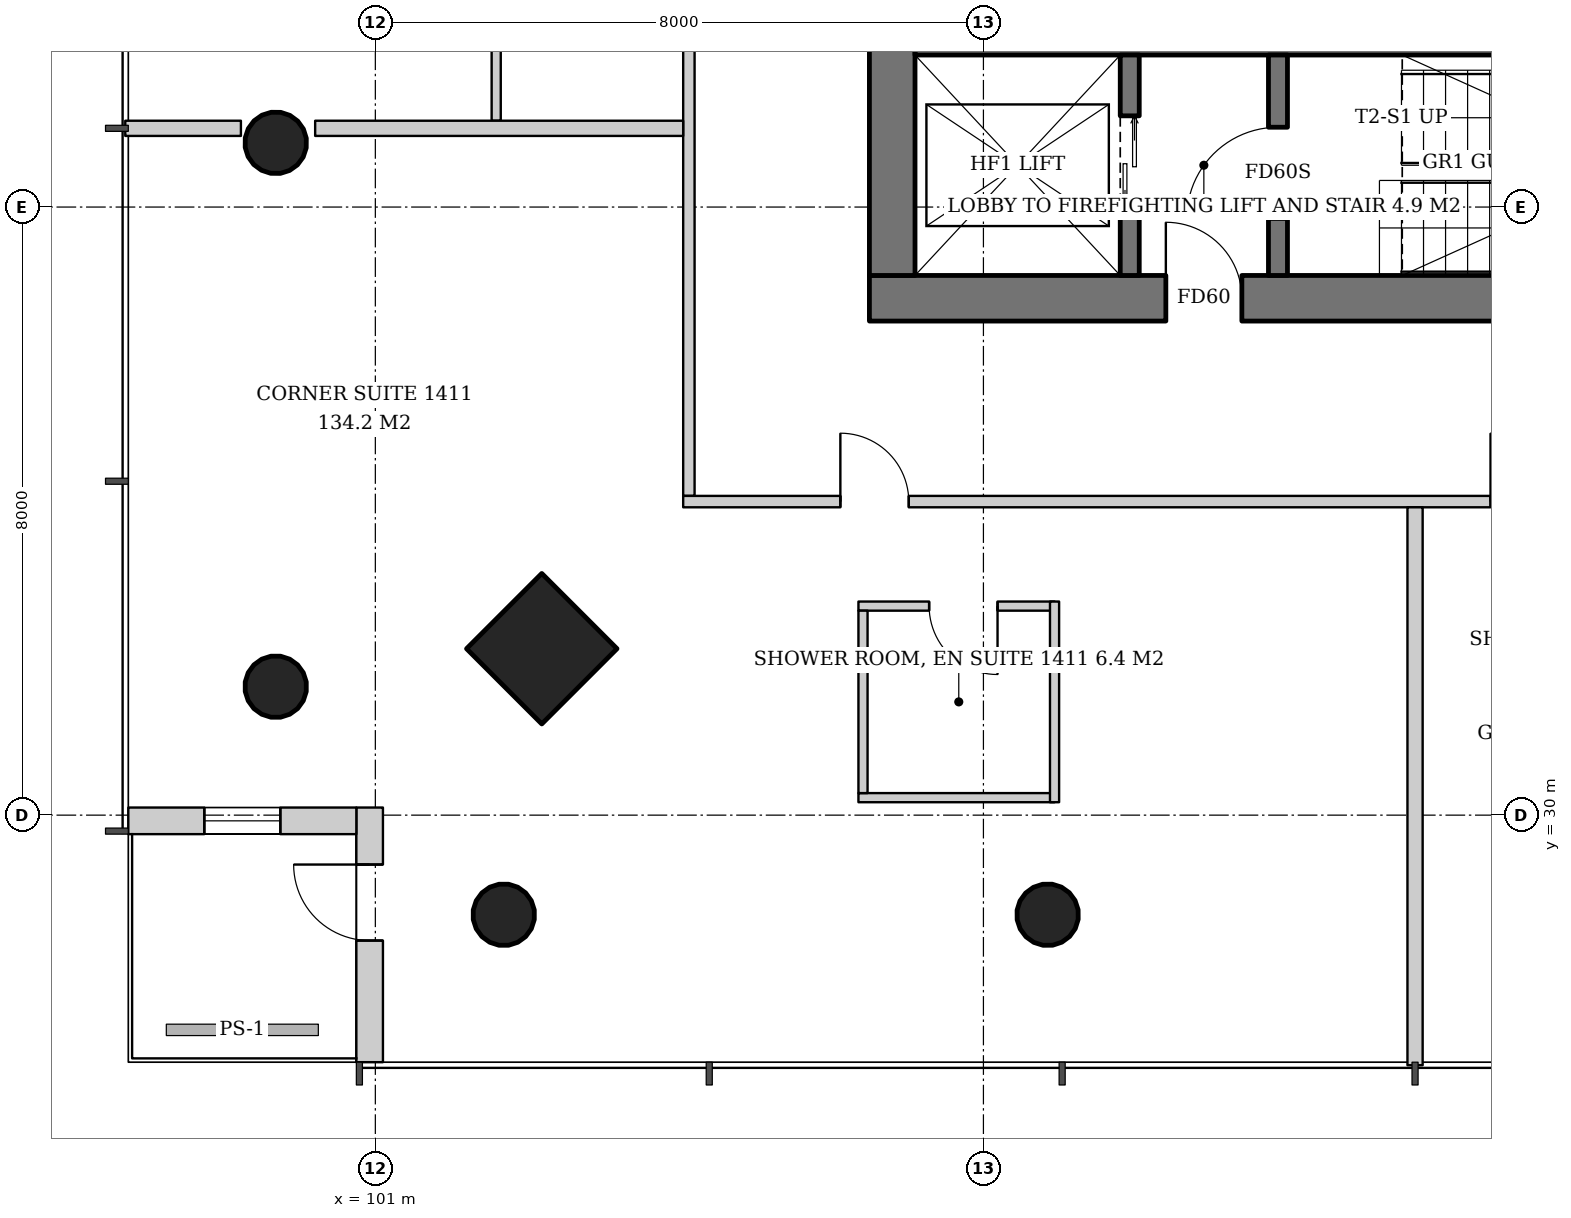
"""IFC4 building model, lengths in metres.
Left out: names, types, materials, properties, quantities, classifications, styles, units other than length and angle.
Written with IfcOpenShell. Run it as: python <this file> out.ifc"""

import sys

from ifc_helpers import new_model, si_unit, direction, frame, frame_2d, origin, origin_2d, place, context, subcontext, project, spatial, rectangle, hollow_circle, extrude, element, fill, save


model = new_model("IFC4")
c1 = context("Model", 3, precision=1e-05, world=origin(), true_north=direction((0.0, 1.0)))
c2 = subcontext(c1, "Body", "Model", "MODEL_VIEW")
j1 = project(units=[si_unit("LENGTHUNIT", "METRE"), si_unit("PLANEANGLEUNIT", "RADIAN")], contexts=[c1])
p1 = place(None, origin())
s1 = spatial("IfcSite", under=j1, at=p1, CompositionType="ELEMENT")
p2 = place(p1, origin())
s2 = spatial("IfcBuilding", under=s1, at=p2, CompositionType="ELEMENT")
p3 = place(p2, frame((0.0, 0.0, 59.0)))
s3 = spatial("IfcBuildingStorey", under=s2, at=p3, CompositionType="ELEMENT", Elevation=59.0)
p4 = place(p3, frame((103.138, 32.138, 0.0), z_axis=(0.043029647111, 0.043029647111, 0.998146732169), x_axis=(-0.707106781187, 0.707106781187, 0.0)))
e1 = element("IfcColumn", 1, at=p4, inside=s3, PredefinedType="COLUMN", context=c2, shape_type="SweptSolid", body=[
    extrude(rectangle(XDim=1.4, YDim=1.4, at=origin_2d()), origin(), (0.0, 0.0, 1.0), 3.807),
])
p5 = place(p3, frame((99.638, 31.638, 0.0), z_axis=(0.043029647111, 0.043029647111, 0.998146732169), x_axis=(-0.707106781187, 0.707106781187, 0.0)))
e2 = element("IfcColumn", 2, at=p5, inside=s3, PredefinedType="COLUMN", context=c2, shape_type="SweptSolid", body=[
    extrude(hollow_circle(Radius=0.406, WallThickness=0.03, at=origin_2d()), origin(), (0.0, 0.0, 1.0), 3.807),
])
p6 = place(p3, frame((99.638, 38.819, 0.0), z_axis=(0.043059525333, 0.021561848751, 0.998839808957), x_axis=(-0.44774654769, 0.894160516368, 0.0)))
e3 = element("IfcColumn", 3, at=p6, inside=s3, PredefinedType="COLUMN", context=c2, shape_type="SweptSolid", body=[
    extrude(hollow_circle(Radius=0.406, WallThickness=0.03, at=origin_2d()), origin(), (0.0, 0.0, 1.0), 3.804),
])
p7 = place(p3, frame((102.638, 28.638, 0.0), z_axis=(0.043029647111, 0.043029647111, 0.998146732169), x_axis=(-0.707106781187, 0.707106781187, 0.0)))
e4 = element("IfcColumn", 4, at=p7, inside=s3, PredefinedType="COLUMN", context=c2, shape_type="SweptSolid", body=[
    extrude(hollow_circle(Radius=0.406, WallThickness=0.03, at=origin_2d()), origin(), (0.0, 0.0, 1.0), 3.807),
])
p8 = place(p3, frame((109.819, 28.638, 0.0), z_axis=(0.021561848751, 0.043059525333, 0.998839808957), x_axis=(-0.894160516368, 0.44774654769, 0.0)))
e5 = element("IfcColumn", 5, at=p8, inside=s3, PredefinedType="COLUMN", context=c2, shape_type="SweptSolid", body=[
    extrude(hollow_circle(Radius=0.406, WallThickness=0.03, at=origin_2d()), origin(), (0.0, 0.0, 1.0), 3.804),
])
p9 = place(p3, frame((107.5, 36.8, 0.0), z_axis=(0.0, 0.0, 1.0), x_axis=(1.0, 0.0, 0.0)))
e6 = element("IfcWall", 6, at=p9, inside=s3, PredefinedType="SHEAR", context=c2, shape_type="SweptSolid", body=[
    extrude(rectangle(XDim=19.0, YDim=0.6, at=frame_2d((9.5, 0.0))), origin(), (0.0, 0.0, 1.0), 3.8),
])
p10 = place(p9, frame((3.9, 0.0, 0.0)))
e7 = element("IfcOpeningElement", 7, at=p10, cuts=e6, PredefinedType="OPENING", context=c2, shape_type="SweptSolid", body=[
    extrude(rectangle(XDim=1.0, YDim=2.1, at=frame_2d((0.5, 1.05))), frame((0.0, 0.31, 0.0), z_axis=(0.0, -1.0, 0.0), x_axis=(1.0, 0.0, 0.0)), (0.0, 0.0, 1.0), 0.62),
])
p11 = place(p9, frame((14.61, 0.0, 0.0)))
e8 = element("IfcOpeningElement", 8, at=p11, cuts=e6, PredefinedType="OPENING", context=c2, shape_type="SweptSolid", body=[
    extrude(rectangle(XDim=1.0, YDim=2.1, at=frame_2d((0.5, 1.05))), frame((0.0, 0.31, 0.0), z_axis=(0.0, -1.0, 0.0), x_axis=(1.0, 0.0, 0.0)), (0.0, 0.0, 1.0), 0.62),
])
p12 = place(p9, frame((16.639, 0.0, 0.0)))
e9 = element("IfcOpeningElement", 9, at=p12, cuts=e6, PredefinedType="OPENING", context=c2, shape_type="SweptSolid", body=[
    extrude(rectangle(XDim=1.0, YDim=2.1, at=frame_2d((0.5, 1.05))), frame((0.0, 0.31, 0.0), z_axis=(0.0, -1.0, 0.0), x_axis=(1.0, 0.0, 0.0)), (0.0, 0.0, 1.0), 0.62),
])
p13 = place(p3, frame((107.8, 37.1, 0.0), z_axis=(0.0, 0.0, 1.0), x_axis=(0.0, 1.0, 0.0)))
e10 = element("IfcWall", 10, at=p13, inside=s3, PredefinedType="SHEAR", context=c2, shape_type="SweptSolid", body=[
    extrude(rectangle(XDim=17.8, YDim=0.6, at=frame_2d((8.9, 0.0))), origin(), (0.0, 0.0, 1.0), 3.8),
])
p14 = place(p13, frame((8.0, 0.0, 0.0)))
e11 = element("IfcOpeningElement", 11, at=p14, cuts=e10, PredefinedType="OPENING", context=c2, shape_type="SweptSolid", body=[
    extrude(rectangle(XDim=1.8, YDim=2.4, at=frame_2d((0.9, 1.2))), frame((0.0, 0.31, 0.0), z_axis=(0.0, -1.0, 0.0), x_axis=(1.0, 0.0, 0.0)), (0.0, 0.0, 1.0), 0.62),
])
p15 = place(p3, frame((108.1, 40.2, 0.0), z_axis=(0.0, 0.0, 1.0), x_axis=(1.0, 0.0, 0.0)))
e12 = element("IfcWall", 12, at=p15, inside=s3, PredefinedType="SHEAR", context=c2, shape_type="SweptSolid", body=[
    extrude(rectangle(XDim=17.8, YDim=0.4, at=frame_2d((8.9, 0.0))), origin(), (0.0, 0.0, 1.0), 3.8),
])
p16 = place(p3, frame((100.925, 26.75, 0.0), z_axis=(0.0, 0.0, 1.0), x_axis=(0.0, 1.0, 0.0)))
e13 = element("IfcWall", 13, at=p16, inside=s3, PredefinedType="SOLIDWALL", context=c2, shape_type="SweptSolid", body=[
    extrude(rectangle(XDim=3.35, YDim=0.35, at=frame_2d((1.675, 0.0))), origin(), (0.0, 0.0, 1.0), 3.6),
])
p17 = place(p16, frame((1.6, 0.0, 0.0)))
e14 = element("IfcOpeningElement", 14, at=p17, cuts=e13, PredefinedType="OPENING", context=c2, shape_type="SweptSolid", body=[
    extrude(rectangle(XDim=1.0, YDim=2.4, at=frame_2d((0.5, 1.2))), frame((0.0, 0.185, 0.0), z_axis=(0.0, -1.0, 0.0), x_axis=(1.0, 0.0, 0.0)), (0.0, 0.0, 1.0), 0.37),
])
p18 = place(p3, frame((100.75, 29.925, 0.0), z_axis=(0.0, 0.0, 1.0), x_axis=(-1.0, 0.0, 0.0)))
e15 = element("IfcWall", 15, at=p18, inside=s3, PredefinedType="SOLIDWALL", context=c2, shape_type="SweptSolid", body=[
    extrude(rectangle(XDim=3.0, YDim=0.35, at=frame_2d((1.5, 0.0))), origin(), (0.0, 0.0, 1.0), 3.6),
])
p19 = place(p18, frame((1.0, 0.0, 0.9)))
e16 = element("IfcOpeningElement", 16, at=p19, cuts=e15, PredefinedType="OPENING", context=c2, shape_type="SweptSolid", body=[
    extrude(rectangle(XDim=1.0, YDim=2.4, at=frame_2d((0.5, 1.2))), frame((0.0, 0.185, 0.0), z_axis=(0.0, -1.0, 0.0), x_axis=(1.0, 0.0, 0.0)), (0.0, 0.0, 1.0), 0.37),
])
p20 = place(p3, frame((110.925, 37.1, 0.0), z_axis=(0.0, 0.0, 1.0), x_axis=(0.0, 1.0, 0.0)))
e17 = element("IfcWall", 17, at=p20, inside=s3, PredefinedType="SHEAR", context=c2, shape_type="SweptSolid", body=[
    extrude(rectangle(XDim=2.9, YDim=0.25, at=frame_2d((1.45, 0.0))), origin(), (0.0, 0.0, 1.0), 3.8),
])
p21 = place(p20, frame((0.8, 0.0, 0.0)))
e18 = element("IfcOpeningElement", 18, at=p21, cuts=e17, PredefinedType="OPENING", context=c2, shape_type="SweptSolid", body=[
    extrude(rectangle(XDim=1.3, YDim=2.2, at=frame_2d((0.65, 1.1))), frame((0.0, 0.135, 0.0), z_axis=(0.0, -1.0, 0.0), x_axis=(1.0, 0.0, 0.0)), (0.0, 0.0, 1.0), 0.27),
])
p22 = place(p3, frame((112.875, 37.1, 0.0), z_axis=(0.0, 0.0, 1.0), x_axis=(0.0, 1.0, 0.0)))
e19 = element("IfcWall", 19, at=p22, inside=s3, PredefinedType="SHEAR", context=c2, shape_type="SweptSolid", body=[
    extrude(rectangle(XDim=2.9, YDim=0.25, at=frame_2d((1.45, 0.0))), origin(), (0.0, 0.0, 1.0), 3.8),
])
p23 = place(p22, frame((0.75, 0.0, 0.0)))
e20 = element("IfcOpeningElement", 20, at=p23, cuts=e19, PredefinedType="OPENING", context=c2, shape_type="SweptSolid", body=[
    extrude(rectangle(XDim=1.2, YDim=2.1, at=frame_2d((0.6, 1.05))), frame((0.0, 0.135, 0.0), z_axis=(0.0, -1.0, 0.0), x_axis=(1.0, 0.0, 0.0)), (0.0, 0.0, 1.0), 0.27),
])
p24 = place(p3, frame((102.59, 41.556, 0.0), z_axis=(0.0, 0.0, 1.0), x_axis=(0.0, -1.0, 0.0)))
e21 = element("IfcWall", 21, at=p24, inside=s3, PredefinedType="PARTITIONING", context=c2, shape_type="SweptSolid", body=[
    extrude(rectangle(XDim=2.42, YDim=0.12, at=frame_2d((1.21, 0.0))), origin(), (0.0, 0.0, 1.0), 3.6),
])
p25 = place(p3, frame((105.125, 57.95, 0.0), z_axis=(0.0, 0.0, 1.0), x_axis=(0.0, -1.0, 0.0)))
e22 = element("IfcWall", 22, at=p25, inside=s3, PredefinedType="PARTITIONING", context=c2, shape_type="SweptSolid", body=[
    extrude(rectangle(XDim=23.75, YDim=0.15, at=frame_2d((11.875, 0.0))), origin(), (0.0, 0.0, 1.0), 2.8),
])
p26 = place(p25, frame((2.068, 0.0, 0.0)))
e23 = element("IfcOpeningElement", 23, at=p26, cuts=e22, PredefinedType="OPENING", context=c2, shape_type="SweptSolid", body=[
    extrude(rectangle(XDim=0.9, YDim=2.1, at=frame_2d((0.45, 1.05))), frame((0.0, 0.085, 0.0), z_axis=(0.0, -1.0, 0.0), x_axis=(1.0, 0.0, 0.0)), (0.0, 0.0, 1.0), 0.17),
])
p27 = place(p25, frame((7.686, 0.0, 0.0)))
e24 = element("IfcOpeningElement", 24, at=p27, cuts=e22, PredefinedType="OPENING", context=c2, shape_type="SweptSolid", body=[
    extrude(rectangle(XDim=1.0, YDim=2.1, at=frame_2d((0.5, 1.05))), frame((0.0, 0.085, 0.0), z_axis=(0.0, -1.0, 0.0), x_axis=(1.0, 0.0, 0.0)), (0.0, 0.0, 1.0), 0.17),
])
p28 = place(p25, frame((12.379, 0.0, 0.0)))
e25 = element("IfcOpeningElement", 25, at=p28, cuts=e22, PredefinedType="OPENING", context=c2, shape_type="SweptSolid", body=[
    extrude(rectangle(XDim=0.9, YDim=2.1, at=frame_2d((0.45, 1.05))), frame((0.0, 0.085, 0.0), z_axis=(0.0, -1.0, 0.0), x_axis=(1.0, 0.0, 0.0)), (0.0, 0.0, 1.0), 0.17),
])
p29 = place(p25, frame((15.264, 0.0, 0.0)))
e26 = element("IfcOpeningElement", 26, at=p29, cuts=e22, PredefinedType="OPENING", context=c2, shape_type="SweptSolid", body=[
    extrude(rectangle(XDim=0.9, YDim=2.1, at=frame_2d((0.45, 1.05))), frame((0.0, 0.085, 0.0), z_axis=(0.0, -1.0, 0.0), x_axis=(1.0, 0.0, 0.0)), (0.0, 0.0, 1.0), 0.17),
])
p30 = place(p3, frame((105.05, 39.036, 0.0), z_axis=(0.0, 0.0, 1.0), x_axis=(-1.0, 0.0, 0.0)))
e27 = element("IfcWall", 27, at=p30, inside=s3, PredefinedType="PARTITIONING", context=c2, shape_type="SweptSolid", body=[
    extrude(rectangle(XDim=4.842, YDim=0.2, at=frame_2d((2.421, 0.0))), origin(), (0.0, 0.0, 1.0), 3.6),
])
p31 = place(p3, frame((99.231, 39.036, 0.0), z_axis=(0.0, 0.0, 1.0), x_axis=(-1.0, 0.0, 0.0)))
e28 = element("IfcWall", 28, at=p31, inside=s3, PredefinedType="PARTITIONING", context=c2, shape_type="SweptSolid", body=[
    extrude(rectangle(XDim=1.521, YDim=0.2, at=frame_2d((0.761, 0.0))), origin(), (0.0, 0.0, 1.0), 3.6),
])
p32 = place(p3, frame((109.936, 32.75, 0.0), z_axis=(0.0, 0.0, 1.0), x_axis=(-1.0, 0.0, 0.0)))
e29 = element("IfcWall", 29, at=p32, inside=s3, PredefinedType="PARTITIONING", context=c2, shape_type="SweptSolid", body=[
    extrude(rectangle(XDim=2.58, YDim=0.12, at=frame_2d((1.29, 0.0))), origin(), (0.0, 0.0, 1.0), 2.8),
])
p33 = place(p32, frame((0.75, 0.0, 0.0)))
e30 = element("IfcOpeningElement", 30, at=p33, cuts=e29, PredefinedType="OPENING", context=c2, shape_type="SweptSolid", body=[
    extrude(rectangle(XDim=0.9, YDim=2.1, at=frame_2d((0.45, 1.05))), frame((0.0, 0.07, 0.0), z_axis=(0.0, -1.0, 0.0), x_axis=(1.0, 0.0, 0.0)), (0.0, 0.0, 1.0), 0.14),
])
p34 = place(p3, frame((109.936, 30.23, 0.0), z_axis=(0.0, 0.0, 1.0), x_axis=(-1.0, 0.0, 0.0)))
e31 = element("IfcWall", 31, at=p34, inside=s3, PredefinedType="PARTITIONING", context=c2, shape_type="SweptSolid", body=[
    extrude(rectangle(XDim=2.58, YDim=0.12, at=frame_2d((1.29, 0.0))), origin(), (0.0, 0.0, 1.0), 2.8),
])
p35 = place(p3, frame((107.416, 32.69, 0.0), z_axis=(0.0, 0.0, 1.0), x_axis=(0.0, -1.0, 0.0)))
e32 = element("IfcWall", 32, at=p35, inside=s3, PredefinedType="PARTITIONING", context=c2, shape_type="SweptSolid", body=[
    extrude(rectangle(XDim=2.4, YDim=0.12, at=frame_2d((1.2, 0.0))), origin(), (0.0, 0.0, 1.0), 3.6),
])
p36 = place(p3, frame((109.936, 32.81, 0.0), z_axis=(0.0, 0.0, 1.0), x_axis=(0.0, -1.0, 0.0)))
e33 = element("IfcWall", 33, at=p36, inside=s3, PredefinedType="PARTITIONING", context=c2, shape_type="SweptSolid", body=[
    extrude(rectangle(XDim=2.64, YDim=0.12, at=frame_2d((1.32, 0.0))), origin(), (0.0, 0.0, 1.0), 3.6),
])
p37 = place(p3, frame((105.05, 34.125, 0.0), z_axis=(0.0, 0.0, 1.0), x_axis=(1.0, 0.0, 0.0)))
e34 = element("IfcWall", 34, at=p37, inside=s3, PredefinedType="PARTITIONING", context=c2, shape_type="SweptSolid", body=[
    extrude(rectangle(XDim=23.75, YDim=0.15, at=frame_2d((11.875, 0.0))), origin(), (0.0, 0.0, 1.0), 2.8),
])
p38 = place(p37, frame((2.068, 0.0, 0.0)))
e35 = element("IfcOpeningElement", 35, at=p38, cuts=e34, PredefinedType="OPENING", context=c2, shape_type="SweptSolid", body=[
    extrude(rectangle(XDim=0.9, YDim=2.1, at=frame_2d((0.45, 1.05))), frame((0.0, 0.085, 0.0), z_axis=(0.0, -1.0, 0.0), x_axis=(1.0, 0.0, 0.0)), (0.0, 0.0, 1.0), 0.17),
])
p39 = place(p37, frame((10.621, 0.0, 0.0)))
e36 = element("IfcOpeningElement", 36, at=p39, cuts=e34, PredefinedType="OPENING", context=c2, shape_type="SweptSolid", body=[
    extrude(rectangle(XDim=0.9, YDim=2.1, at=frame_2d((0.45, 1.05))), frame((0.0, 0.085, 0.0), z_axis=(0.0, -1.0, 0.0), x_axis=(1.0, 0.0, 0.0)), (0.0, 0.0, 1.0), 0.17),
])
p40 = place(p37, frame((17.021, 0.0, 0.0)))
e37 = element("IfcOpeningElement", 37, at=p40, cuts=e34, PredefinedType="OPENING", context=c2, shape_type="SweptSolid", body=[
    extrude(rectangle(XDim=0.9, YDim=2.1, at=frame_2d((0.45, 1.05))), frame((0.0, 0.085, 0.0), z_axis=(0.0, -1.0, 0.0), x_axis=(1.0, 0.0, 0.0)), (0.0, 0.0, 1.0), 0.17),
])
p41 = place(p3, frame((114.678, 34.05, 0.0), z_axis=(0.0, 0.0, 1.0), x_axis=(0.0, -1.0, 0.0)))
e38 = element("IfcWall", 38, at=p41, inside=s3, PredefinedType="PARTITIONING", context=c2, shape_type="SweptSolid", body=[
    extrude(rectangle(XDim=7.34, YDim=0.2, at=frame_2d((3.67, 0.0))), origin(), (0.0, 0.0, 1.0), 3.05),
])
p42 = place(p17, origin())
e39 = element("IfcDoor", 39, at=p42, inside=s3, OperationType="SINGLE_SWING_RIGHT", PredefinedType="DOOR", context=c2, shape_type="SweptSolid", body=[
    extrude(rectangle(XDim=1.0, YDim=2.4, at=frame_2d((0.5, 1.2))), frame((0.0, 0.025, 0.0), z_axis=(0.0, -1.0, 0.0), x_axis=(1.0, 0.0, 0.0)), (0.0, 0.0, 1.0), 0.05),
])
fill(e14, e39)
p43 = place(p19, origin())
e40 = element("IfcWindow", 40, at=p43, inside=s3, PartitioningType="SINGLE_PANEL", PredefinedType="WINDOW", context=c2, shape_type="SweptSolid", body=[
    extrude(rectangle(XDim=1.0, YDim=2.4, at=frame_2d((0.5, 1.2))), frame((0.0, 0.03, 0.0), z_axis=(0.0, -1.0, 0.0), x_axis=(1.0, 0.0, 0.0)), (0.0, 0.0, 1.0), 0.06),
])
fill(e16, e40)
p44 = place(p21, origin())
e41 = element("IfcDoor", 41, at=p44, inside=s3, OperationType="DOUBLE_DOOR_SLIDING", PredefinedType="DOOR", context=c2, shape_type="SweptSolid", body=[
    extrude(rectangle(XDim=1.3, YDim=2.2, at=frame_2d((0.65, 1.1))), frame((0.0, 0.025, 0.0), z_axis=(0.0, -1.0, 0.0), x_axis=(1.0, 0.0, 0.0)), (0.0, 0.0, 1.0), 0.05),
])
fill(e18, e41)
p45 = place(p23, origin())
e42 = element("IfcDoor", 42, at=p45, inside=s3, OperationType="SINGLE_SWING_LEFT", PredefinedType="DOOR", context=c2, shape_type="SweptSolid", body=[
    extrude(rectangle(XDim=1.2, YDim=2.1, at=frame_2d((0.6, 1.05))), frame((0.0, 0.025, 0.0), z_axis=(0.0, -1.0, 0.0), x_axis=(1.0, 0.0, 0.0)), (0.0, 0.0, 1.0), 0.05),
])
fill(e20, e42)
p46 = place(p10, origin())
e43 = element("IfcDoor", 43, at=p46, inside=s3, OperationType="SINGLE_SWING_LEFT", PredefinedType="DOOR", context=c2, shape_type="SweptSolid", body=[
    extrude(rectangle(XDim=1.0, YDim=2.1, at=frame_2d((0.5, 1.05))), frame((0.0, 0.025, 0.0), z_axis=(0.0, -1.0, 0.0), x_axis=(1.0, 0.0, 0.0)), (0.0, 0.0, 1.0), 0.05),
])
fill(e7, e43)
p47 = place(p33, origin())
e44 = element("IfcDoor", 44, at=p47, inside=s3, OperationType="SINGLE_SWING_LEFT", PredefinedType="DOOR", context=c2, shape_type="SweptSolid", body=[
    extrude(rectangle(XDim=0.9, YDim=2.1, at=frame_2d((0.45, 1.05))), frame((0.0, 0.025, 0.0), z_axis=(0.0, -1.0, 0.0), x_axis=(1.0, 0.0, 0.0)), (0.0, 0.0, 1.0), 0.05),
])
fill(e30, e44)
p48 = place(p38, origin())
e45 = element("IfcDoor", 45, at=p48, inside=s3, OperationType="SINGLE_SWING_LEFT", PredefinedType="DOOR", context=c2, shape_type="SweptSolid", body=[
    extrude(rectangle(XDim=0.9, YDim=2.1, at=frame_2d((0.45, 1.05))), frame((0.0, 0.025, 0.0), z_axis=(0.0, -1.0, 0.0), x_axis=(1.0, 0.0, 0.0)), (0.0, 0.0, 1.0), 0.05),
])
fill(e35, e45)
p49 = place(p39, origin())
e46 = element("IfcDoor", 46, at=p49, inside=s3, OperationType="SINGLE_SWING_LEFT", PredefinedType="DOOR", context=c2, shape_type="SweptSolid", body=[
    extrude(rectangle(XDim=0.9, YDim=2.1, at=frame_2d((0.45, 1.05))), frame((0.0, 0.025, 0.0), z_axis=(0.0, -1.0, 0.0), x_axis=(1.0, 0.0, 0.0)), (0.0, 0.0, 1.0), 0.05),
])
fill(e36, e46)
save(model, sys.argv[1])
